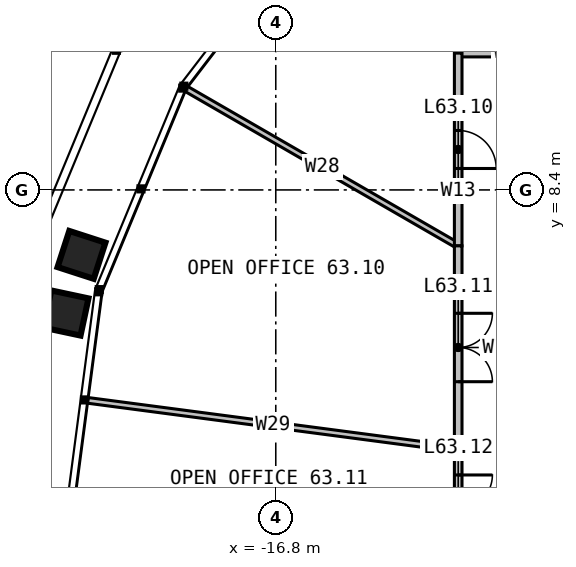
"""IFC4 building model, lengths in metres.
Left out: names, types, materials, properties, quantities, classifications, styles, units other than length and angle.
Written with IfcOpenShell. Run it as: python <this file> out.ifc"""

import sys

from ifc_helpers import new_model, si_unit, direction, frame, frame_2d, origin, place, context, subcontext, project, spatial, rectangle, extrude, element, fill, save


model = new_model("IFC4")
c1 = context("Model", 3, precision=1e-05, world=origin(), true_north=direction((0.0, 1.0)))
c2 = subcontext(c1, "Body", "Model", "MODEL_VIEW")
j1 = project(units=[si_unit("LENGTHUNIT", "METRE"), si_unit("PLANEANGLEUNIT", "RADIAN")], contexts=[c1])
p1 = place(None, origin())
s1 = spatial("IfcSite", under=j1, at=p1, CompositionType="ELEMENT")
p2 = place(p1, origin())
s2 = spatial("IfcBuilding", under=s1, at=p2, CompositionType="ELEMENT")
p3 = place(p2, frame((0.0, 0.0, 260.0)))
s3 = spatial("IfcBuildingStorey", under=s2, at=p3, CompositionType="ELEMENT", Elevation=260.0)
p4 = place(p3, frame((-6.928, 12.0, 0.0), z_axis=(0.0, 0.0, 1.0), x_axis=(-0.499989206474, 0.86603163534, 0.0)))
e1 = element("IfcWall", 1, at=p4, inside=s3, PredefinedType="PARTITIONING", context=c2, shape_type="SweptSolid", body=[
    extrude(rectangle(XDim=8.266, YDim=0.15, at=frame_2d((4.133, 0.0))), origin(), (0.0, 0.0, 1.0), 2.79),
])
p5 = place(p3, frame((-9.208, 12.0, 0.0), z_axis=(0.0, 0.0, 1.0), x_axis=(-0.608760519279, 0.793354038351, 0.0)))
e2 = element("IfcWall", 2, at=p5, inside=s3, PredefinedType="PARTITIONING", context=c2, shape_type="SweptSolid", body=[
    extrude(rectangle(XDim=6.807, YDim=0.15, at=frame_2d((3.404, 0.0))), origin(), (0.0, 0.0, 1.0), 2.79),
])
p6 = place(p3, frame((-12.0, 6.928, 0.0), z_axis=(0.0, 0.0, 1.0), x_axis=(-0.86603163534, 0.499989206474, 0.0)))
e3 = element("IfcWall", 3, at=p6, inside=s3, PredefinedType="PARTITIONING", context=c2, shape_type="SweptSolid", body=[
    extrude(rectangle(XDim=8.266, YDim=0.15, at=frame_2d((4.133, 0.0))), origin(), (0.0, 0.0, 1.0), 2.79),
])
p7 = place(p3, frame((-12.0, 1.58, 0.0), z_axis=(0.0, 0.0, 1.0), x_axis=(-0.991445416611, 0.130521974705, 0.0)))
e4 = element("IfcWall", 4, at=p7, inside=s3, PredefinedType="PARTITIONING", context=c2, shape_type="SweptSolid", body=[
    extrude(rectangle(XDim=9.829, YDim=0.15, at=frame_2d((4.915, 0.0))), origin(), (0.0, 0.0, 1.0), 2.79),
])
p8 = place(p3, frame((-9.208, 12.0, 0.0), z_axis=(0.0, 0.0, 1.0), x_axis=(-1.0, 0.0, 0.0)))
e5 = element("IfcWall", 5, at=p8, inside=s3, PredefinedType="PARTITIONING", context=c2, shape_type="SweptSolid", body=[
    extrude(rectangle(XDim=2.792, YDim=0.2, at=frame_2d((1.396, 0.0))), origin(), (0.0, 0.0, 1.0), 3.8),
])
p9 = place(p3, frame((-12.0, 12.0, 0.0), z_axis=(0.0, 0.0, 1.0), x_axis=(0.0, -1.0, 0.0)))
e6 = element("IfcWall", 6, at=p9, inside=s3, PredefinedType="PARTITIONING", context=c2, shape_type="SweptSolid", body=[
    extrude(rectangle(XDim=5.072, YDim=0.2, at=frame_2d((2.536, 0.0))), origin(), (0.0, 0.0, 1.0), 3.8),
])
p10 = place(p9, frame((2.036, 0.0, 0.0)))
e7 = element("IfcOpeningElement", 7, at=p10, cuts=e6, PredefinedType="OPENING", context=c2, shape_type="SweptSolid", body=[
    extrude(rectangle(XDim=1.0, YDim=2.2, at=frame_2d((0.5, 1.1))), frame((0.0, 0.11, 0.0), z_axis=(0.0, -1.0, 0.0), x_axis=(1.0, 0.0, 0.0)), (0.0, 0.0, 1.0), 0.22),
])
p11 = place(p3, frame((-12.0, 6.928, 0.0), z_axis=(0.0, 0.0, 1.0), x_axis=(0.0, -1.0, 0.0)))
e8 = element("IfcWall", 8, at=p11, inside=s3, PredefinedType="PARTITIONING", context=c2, shape_type="SweptSolid", body=[
    extrude(rectangle(XDim=5.348, YDim=0.2, at=frame_2d((2.674, 0.0))), origin(), (0.0, 0.0, 1.0), 3.8),
])
p12 = place(p11, frame((1.774, 0.0, 0.0)))
e9 = element("IfcOpeningElement", 9, at=p12, cuts=e8, PredefinedType="OPENING", context=c2, shape_type="SweptSolid", body=[
    extrude(rectangle(XDim=1.8, YDim=2.2, at=frame_2d((0.9, 1.1))), frame((0.0, 0.11, 0.0), z_axis=(0.0, -1.0, 0.0), x_axis=(1.0, 0.0, 0.0)), (0.0, 0.0, 1.0), 0.22),
])
p13 = place(p3, frame((-12.0, 1.58, 0.0), z_axis=(0.0, 0.0, 1.0), x_axis=(0.0, -1.0, 0.0)))
e10 = element("IfcWall", 10, at=p13, inside=s3, PredefinedType="PARTITIONING", context=c2, shape_type="SweptSolid", body=[
    extrude(rectangle(XDim=3.16, YDim=0.2, at=frame_2d((1.58, 0.0))), origin(), (0.0, 0.0, 1.0), 3.8),
])
p14 = place(p13, frame((0.68, 0.0, 0.0)))
e11 = element("IfcOpeningElement", 11, at=p14, cuts=e10, PredefinedType="OPENING", context=c2, shape_type="SweptSolid", body=[
    extrude(rectangle(XDim=1.8, YDim=2.2, at=frame_2d((0.9, 1.1))), frame((0.0, 0.11, 0.0), z_axis=(0.0, -1.0, 0.0), x_axis=(1.0, 0.0, 0.0)), (0.0, 0.0, 1.0), 0.22),
])
p15 = place(p10, origin())
e12 = element("IfcDoor", 12, at=p15, inside=s3, OperationType="SINGLE_SWING_RIGHT", PredefinedType="DOOR", context=c2, shape_type="SweptSolid", body=[
    extrude(rectangle(XDim=1.0, YDim=2.2, at=frame_2d((0.5, 1.1))), frame((0.0, 0.025, 0.0), z_axis=(0.0, -1.0, 0.0), x_axis=(1.0, 0.0, 0.0)), (0.0, 0.0, 1.0), 0.05),
])
fill(e7, e12)
p16 = place(p12, origin())
e13 = element("IfcDoor", 13, at=p16, inside=s3, OperationType="DOUBLE_DOOR_SINGLE_SWING", PredefinedType="DOOR", context=c2, shape_type="SweptSolid", body=[
    extrude(rectangle(XDim=1.8, YDim=2.2, at=frame_2d((0.9, 1.1))), frame((0.0, 0.025, 0.0), z_axis=(0.0, -1.0, 0.0), x_axis=(1.0, 0.0, 0.0)), (0.0, 0.0, 1.0), 0.05),
])
fill(e9, e13)
p17 = place(p14, origin())
e14 = element("IfcDoor", 14, at=p17, inside=s3, OperationType="DOUBLE_DOOR_SINGLE_SWING", PredefinedType="DOOR", context=c2, shape_type="SweptSolid", body=[
    extrude(rectangle(XDim=1.8, YDim=2.2, at=frame_2d((0.9, 1.1))), frame((0.0, 0.025, 0.0), z_axis=(0.0, -1.0, 0.0), x_axis=(1.0, 0.0, 0.0)), (0.0, 0.0, 1.0), 0.05),
])
fill(e11, e14)
save(model, sys.argv[1])
